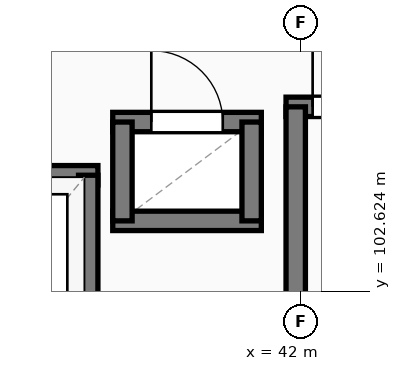
"""IFC4 building model, lengths in metres.
Left out: names, types, materials, properties, quantities, classifications, styles, units other than length and angle.
Written with IfcOpenShell. Run it as: python <this file> out.ifc"""

import sys

from ifc_helpers import new_model, si_unit, direction, frame, frame_2d, origin, place, context, subcontext, project, spatial, rectangle, extrude, element, fill, save


model = new_model("IFC4")
c1 = context("Model", 3, precision=1e-05, world=origin(), true_north=direction((0.0, 1.0)))
c2 = subcontext(c1, "Body", "Model", "MODEL_VIEW")
j1 = project(units=[si_unit("LENGTHUNIT", "METRE"), si_unit("PLANEANGLEUNIT", "RADIAN")], contexts=[c1])
p1 = place(None, origin())
s1 = spatial("IfcSite", under=j1, at=p1, CompositionType="ELEMENT")
p2 = place(p1, origin())
s2 = spatial("IfcBuilding", under=s1, at=p2, CompositionType="ELEMENT")
p3 = place(p2, frame((0.0, 0.0, -4.2)))
s3 = spatial("IfcBuildingStorey", under=s2, at=p3, CompositionType="ELEMENT", Elevation=-4.2)
p4 = place(p3, frame((41.802, 105.05, -0.4), z_axis=(0.0, 0.0, 1.0), x_axis=(1.0, 0.0, 0.0)))
e1 = element("IfcWall", 1, at=p4, inside=s3, PredefinedType="SOLIDWALL", context=c2, shape_type="SweptSolid", body=[
    extrude(rectangle(XDim=8.225, YDim=0.255, at=frame_2d((4.113, 0.0))), origin(), (0.0, 0.0, 1.0), 4.25),
])
p5 = place(p4, frame((0.35, 0.0, 0.4)))
e2 = element("IfcOpeningElement", 2, at=p5, cuts=e1, PredefinedType="OPENING", context=c2, shape_type="SweptSolid", body=[
    extrude(rectangle(XDim=1.16, YDim=2.15, at=frame_2d((0.58, 1.075))), frame((0.0, 0.137, 0.0), z_axis=(0.0, -1.0, 0.0), x_axis=(1.0, 0.0, 0.0)), (0.0, 0.0, 1.0), 0.275),
])
p6 = place(p3, frame((41.93, 101.42, -0.4), z_axis=(0.0, 0.0, 1.0), x_axis=(0.0, 1.0, 0.0)))
e3 = element("IfcWall", 3, at=p6, inside=s3, PredefinedType="SOLIDWALL", context=c2, shape_type="SweptSolid", body=[
    extrude(rectangle(XDim=3.63, YDim=0.255, at=frame_2d((1.815, 0.0))), origin(), (0.0, 0.0, 1.0), 4.25),
])
p7 = place(p3, frame((36.873, 104.15, -0.4), z_axis=(0.0, 0.0, 1.0), x_axis=(1.0, 0.0, 0.0)))
e4 = element("IfcWall", 4, at=p7, inside=s3, PredefinedType="SOLIDWALL", context=c2, shape_type="SweptSolid", body=[
    extrude(rectangle(XDim=2.455, YDim=0.255, at=frame_2d((1.228, 0.0))), origin(), (0.0, 0.0, 1.0), 4.25),
])
p8 = place(p7, frame((0.677, 0.0, 0.4)))
e5 = element("IfcOpeningElement", 5, at=p8, cuts=e4, PredefinedType="OPENING", context=c2, shape_type="SweptSolid", body=[
    extrude(rectangle(XDim=1.1, YDim=2.15, at=frame_2d((0.55, 1.075))), frame((0.0, 0.137, 0.0), z_axis=(0.0, -1.0, 0.0), x_axis=(1.0, 0.0, 0.0)), (0.0, 0.0, 1.0), 0.275),
])
p9 = place(p3, frame((39.2, 101.55, -0.4), z_axis=(0.0, 0.0, 1.0), x_axis=(0.0, 1.0, 0.0)))
e6 = element("IfcWall", 6, at=p9, inside=s3, PredefinedType="SOLIDWALL", context=c2, shape_type="SweptSolid", body=[
    extrude(rectangle(XDim=2.6, YDim=0.255, at=frame_2d((1.3, 0.0))), origin(), (0.0, 0.0, 1.0), 4.25),
])
p10 = place(p3, frame((39.522, 103.55, -0.4), z_axis=(0.0, 0.0, 1.0), x_axis=(1.0, 0.0, 0.0)))
e7 = element("IfcWall", 7, at=p10, inside=s3, PredefinedType="SOLIDWALL", context=c2, shape_type="SweptSolid", body=[
    extrude(rectangle(XDim=1.955, YDim=0.255, at=frame_2d((0.978, 0.0))), origin(), (0.0, 0.0, 1.0), 4.25),
])
p11 = place(p3, frame((39.522, 104.85, -0.4), z_axis=(0.0, 0.0, 1.0), x_axis=(1.0, 0.0, 0.0)))
e8 = element("IfcWall", 8, at=p11, inside=s3, PredefinedType="SOLIDWALL", context=c2, shape_type="SweptSolid", body=[
    extrude(rectangle(XDim=1.955, YDim=0.255, at=frame_2d((0.978, 0.0))), origin(), (0.0, 0.0, 1.0), 4.25),
])
p12 = place(p11, frame((0.508, 0.0, 0.4)))
e9 = element("IfcOpeningElement", 9, at=p12, cuts=e8, PredefinedType="OPENING", context=c2, shape_type="SweptSolid", body=[
    extrude(rectangle(XDim=0.94, YDim=2.1, at=frame_2d((0.47, 1.05))), frame((0.0, 0.137, 0.0), z_axis=(0.0, -1.0, 0.0), x_axis=(1.0, 0.0, 0.0)), (0.0, 0.0, 1.0), 0.275),
])
for number, where, z_axis, x_axis in (
    (10, (39.65, 103.55, -0.4), (0.0, 0.0, 1.0), (0.0, 1.0, 0.0)),
    (11, (41.35, 103.55, -0.4), (0.0, 0.0, 1.0), (0.0, 1.0, 0.0)),
):
    element("IfcWall", number, at=place(p3, frame(where, z_axis=z_axis, x_axis=x_axis)), inside=s3, PredefinedType="SOLIDWALL", context=c2, shape_type="SweptSolid", body=[
        extrude(rectangle(XDim=1.3, YDim=0.255, at=frame_2d((0.65, 0.0))), origin(), (0.0, 0.0, 1.0), 4.25),
    ])
p13 = place(p5, origin())
e12 = element("IfcDoor", 12, at=p13, inside=s3, OperationType="SINGLE_SWING_LEFT", PredefinedType="DOOR", context=c2, shape_type="SweptSolid", body=[
    extrude(rectangle(XDim=1.16, YDim=2.15, at=frame_2d((0.58, 1.075))), frame((0.0, 0.025, 0.0), z_axis=(0.0, -1.0, 0.0), x_axis=(1.0, 0.0, 0.0)), (0.0, 0.0, 1.0), 0.05),
])
fill(e2, e12)
p14 = place(p12, origin())
e13 = element("IfcDoor", 13, at=p14, inside=s3, OperationType="SINGLE_SWING_LEFT", PredefinedType="DOOR", context=c2, shape_type="SweptSolid", body=[
    extrude(rectangle(XDim=0.94, YDim=2.1, at=frame_2d((0.47, 1.05))), frame((0.0, 0.025, 0.0), z_axis=(0.0, -1.0, 0.0), x_axis=(1.0, 0.0, 0.0)), (0.0, 0.0, 1.0), 0.05),
])
fill(e9, e13)
save(model, sys.argv[1])
